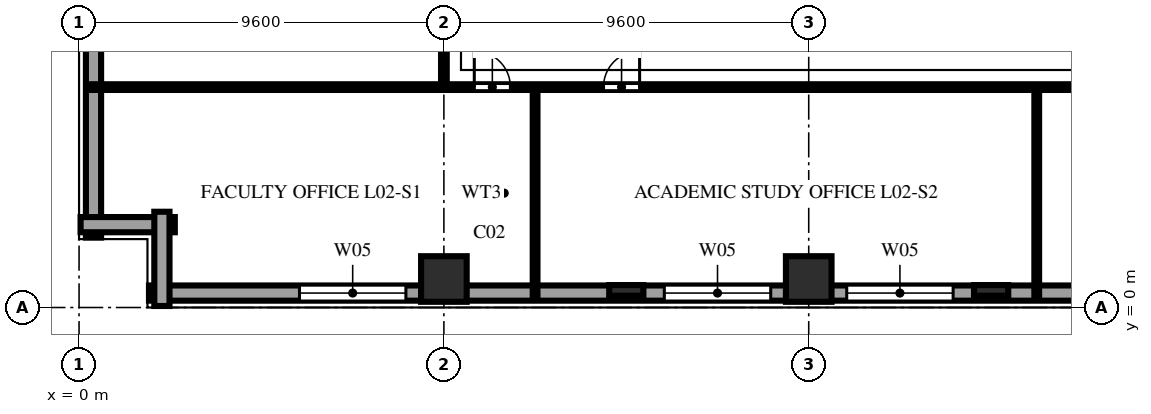
"""IFC4 building model, lengths in metres.
Left out: names, types, materials, properties, quantities, classifications, styles, units other than length and angle.
Written with IfcOpenShell. Run it as: python <this file> out.ifc"""

import sys

from ifc_helpers import new_model, si_unit, direction, frame, frame_2d, origin, origin_2d, place, context, subcontext, project, spatial, rectangle, extrude, element, fill, save


model = new_model("IFC4")
c1 = context("Model", 3, precision=1e-05, world=origin(), true_north=direction((0.0, 1.0)))
c2 = subcontext(c1, "Body", "Model", "MODEL_VIEW")
j1 = project(units=[si_unit("LENGTHUNIT", "METRE"), si_unit("PLANEANGLEUNIT", "RADIAN")], contexts=[c1])
p1 = place(None, origin())
s1 = spatial("IfcSite", under=j1, at=p1, CompositionType="ELEMENT")
p2 = place(p1, origin())
s2 = spatial("IfcBuilding", under=s1, at=p2, CompositionType="ELEMENT")
p3 = place(p2, frame((0.0, 0.0, 10.4)))
s3 = spatial("IfcBuildingStorey", under=s2, at=p3, CompositionType="ELEMENT", Elevation=10.4)
for number, where, z_axis, x_axis in (
    (1, (9.6, 0.75, 0.0), (0.0, 0.0, 1.0), (1.0, 0.0, 0.0)),
    (2, (19.2, 0.75, 0.0), (0.0, 0.0, 1.0), (1.0, 0.0, 0.0)),
):
    element("IfcColumn", number, at=place(p3, frame(where, z_axis=z_axis, x_axis=x_axis)), inside=s3, PredefinedType="COLUMN", context=c2, shape_type="SweptSolid", body=[
        extrude(rectangle(XDim=1.2, YDim=1.2, at=origin_2d()), origin(), (0.0, 0.0, 1.0), 4.6),
    ])
for number, where, z_axis, x_axis in (
    (3, (14.4, 0.45, 0.0), (0.0, 0.0, 1.0), (1.0, 0.0, 0.0)),
    (4, (24.0, 0.45, 0.0), (0.0, 0.0, 1.0), (1.0, 0.0, 0.0)),
):
    element("IfcColumn", number, at=place(p3, frame(where, z_axis=z_axis, x_axis=x_axis)), inside=s3, PredefinedType="PILASTER", context=c2, shape_type="SweptSolid", body=[
        extrude(rectangle(XDim=0.9, YDim=0.28, at=origin_2d()), origin(), (0.0, 0.0, 1.0), 4.6),
    ])
p4 = place(p3, frame((1.84, 0.38, 0.0), z_axis=(0.0, 0.0, 1.0), x_axis=(1.0, 0.0, 0.0)))
e5 = element("IfcWall", 5, at=p4, inside=s3, PredefinedType="SOLIDWALL", context=c2, shape_type="SweptSolid", body=[
    extrude(rectangle(XDim=63.52, YDim=0.4, at=frame_2d((31.76, 0.0))), origin(), (0.0, 0.0, 1.0), 4.26),
])
p5 = place(p4, frame((3.96, 0.0, 0.75)))
e6 = element("IfcOpeningElement", 6, at=p5, cuts=e5, PredefinedType="OPENING", context=c2, shape_type="SweptSolid", body=[
    extrude(rectangle(XDim=2.8, YDim=2.3, at=frame_2d((1.4, 1.15))), frame((0.0, 0.212, 0.0), z_axis=(0.0, -1.0, 0.0), x_axis=(1.0, 0.0, 0.0)), (0.0, 0.0, 1.0), 0.424),
])
p6 = place(p4, frame((13.56, 0.0, 0.75)))
e7 = element("IfcOpeningElement", 7, at=p6, cuts=e5, PredefinedType="OPENING", context=c2, shape_type="SweptSolid", body=[
    extrude(rectangle(XDim=2.8, YDim=2.3, at=frame_2d((1.4, 1.15))), frame((0.0, 0.212, 0.0), z_axis=(0.0, -1.0, 0.0), x_axis=(1.0, 0.0, 0.0)), (0.0, 0.0, 1.0), 0.424),
])
p7 = place(p4, frame((18.36, 0.0, 0.75)))
e8 = element("IfcOpeningElement", 8, at=p7, cuts=e5, PredefinedType="OPENING", context=c2, shape_type="SweptSolid", body=[
    extrude(rectangle(XDim=2.8, YDim=2.3, at=frame_2d((1.4, 1.15))), frame((0.0, 0.212, 0.0), z_axis=(0.0, -1.0, 0.0), x_axis=(1.0, 0.0, 0.0)), (0.0, 0.0, 1.0), 0.424),
])
p8 = place(p4, frame((27.96, 0.0, 0.75)))
e9 = element("IfcOpeningElement", 9, at=p8, cuts=e5, PredefinedType="OPENING", context=c2, shape_type="SweptSolid", body=[
    extrude(rectangle(XDim=2.8, YDim=2.3, at=frame_2d((1.4, 1.15))), frame((0.0, 0.212, 0.0), z_axis=(0.0, -1.0, 0.0), x_axis=(1.0, 0.0, 0.0)), (0.0, 0.0, 1.0), 0.424),
])
p9 = place(p3, frame((0.38, 65.36, 0.0), z_axis=(0.0, 0.0, 1.0), x_axis=(0.0, -1.0, 0.0)))
e10 = element("IfcWall", 10, at=p9, inside=s3, PredefinedType="SOLIDWALL", context=c2, shape_type="SweptSolid", body=[
    extrude(rectangle(XDim=63.52, YDim=0.4, at=frame_2d((31.76, 0.0))), origin(), (0.0, 0.0, 1.0), 4.26),
])
p10 = place(p9, frame((32.76, 0.0, 0.75)))
e11 = element("IfcOpeningElement", 11, at=p10, cuts=e10, PredefinedType="OPENING", context=c2, shape_type="SweptSolid", body=[
    extrude(rectangle(XDim=2.8, YDim=2.3, at=frame_2d((1.4, 1.15))), frame((0.0, 0.212, 0.0), z_axis=(0.0, -1.0, 0.0), x_axis=(1.0, 0.0, 0.0)), (0.0, 0.0, 1.0), 0.424),
])
p11 = place(p9, frame((37.56, 0.0, 0.75)))
e12 = element("IfcOpeningElement", 12, at=p11, cuts=e10, PredefinedType="OPENING", context=c2, shape_type="SweptSolid", body=[
    extrude(rectangle(XDim=2.8, YDim=2.3, at=frame_2d((1.4, 1.15))), frame((0.0, 0.212, 0.0), z_axis=(0.0, -1.0, 0.0), x_axis=(1.0, 0.0, 0.0)), (0.0, 0.0, 1.0), 0.424),
])
p12 = place(p9, frame((42.36, 0.0, 0.75)))
e13 = element("IfcOpeningElement", 13, at=p12, cuts=e10, PredefinedType="OPENING", context=c2, shape_type="SweptSolid", body=[
    extrude(rectangle(XDim=2.8, YDim=2.3, at=frame_2d((1.4, 1.15))), frame((0.0, 0.212, 0.0), z_axis=(0.0, -1.0, 0.0), x_axis=(1.0, 0.0, 0.0)), (0.0, 0.0, 1.0), 0.424),
])
p13 = place(p9, frame((47.16, 0.0, 0.75)))
e14 = element("IfcOpeningElement", 14, at=p13, cuts=e10, PredefinedType="OPENING", context=c2, shape_type="SweptSolid", body=[
    extrude(rectangle(XDim=2.8, YDim=2.3, at=frame_2d((1.4, 1.15))), frame((0.0, 0.212, 0.0), z_axis=(0.0, -1.0, 0.0), x_axis=(1.0, 0.0, 0.0)), (0.0, 0.0, 1.0), 0.424),
])
p14 = place(p9, frame((51.96, 0.0, 0.75)))
e15 = element("IfcOpeningElement", 15, at=p14, cuts=e10, PredefinedType="OPENING", context=c2, shape_type="SweptSolid", body=[
    extrude(rectangle(XDim=2.8, YDim=2.3, at=frame_2d((1.4, 1.15))), frame((0.0, 0.212, 0.0), z_axis=(0.0, -1.0, 0.0), x_axis=(1.0, 0.0, 0.0)), (0.0, 0.0, 1.0), 0.424),
])
for number, where, z_axis, x_axis in (
    (16, (0.04, 2.18, 0.0), (0.0, 0.0, 1.0), (1.0, 0.0, 0.0)),
    (17, (2.18, 2.52, 0.0), (0.0, 0.0, 1.0), (0.0, -1.0, 0.0)),
):
    element("IfcWall", number, at=place(p3, frame(where, z_axis=z_axis, x_axis=x_axis)), inside=s3, PredefinedType="SOLIDWALL", context=c2, shape_type="SweptSolid", body=[
        extrude(rectangle(XDim=2.48, YDim=0.4, at=frame_2d((1.24, 0.0))), origin(), (0.0, 0.0, 1.0), 4.26),
    ])
p15 = place(p3, frame((9.6, 5.8, 0.0), z_axis=(0.0, 0.0, 1.0), x_axis=(0.0, 1.0, 0.0)))
e18 = element("IfcWall", 18, at=p15, inside=s3, PredefinedType="PARTITIONING", context=c2, shape_type="SweptSolid", body=[
    extrude(rectangle(XDim=3.8, YDim=0.15, at=frame_2d((1.9, 0.0))), origin(), (0.0, 0.0, 1.0), 3.644),
])
for number, where, z_axis, x_axis in (
    (19, (12.0, 0.22, 0.0), (0.0, 0.0, 1.0), (0.0, 1.0, 0.0)),
    (20, (25.2, 0.22, 0.0), (0.0, 0.0, 1.0), (0.0, 1.0, 0.0)),
):
    element("IfcWall", number, at=place(p3, frame(where, z_axis=z_axis, x_axis=x_axis)), inside=s3, PredefinedType="PARTITIONING", context=c2, shape_type="SweptSolid", body=[
        extrude(rectangle(XDim=5.58, YDim=0.125, at=frame_2d((2.79, 0.0))), origin(), (0.0, 0.0, 1.0), 4.26),
    ])
p16 = place(p3, frame((0.22, 5.8, 0.0), z_axis=(0.0, 0.0, 1.0), x_axis=(1.0, 0.0, 0.0)))
e21 = element("IfcWall", 21, at=p16, inside=s3, PredefinedType="PARTITIONING", context=c2, shape_type="SweptSolid", body=[
    extrude(rectangle(XDim=52.58, YDim=0.15, at=frame_2d((26.29, 0.0))), origin(), (0.0, 0.0, 1.0), 4.26),
])
p17 = place(p16, frame((10.18, 0.0, 0.0)))
e22 = element("IfcOpeningElement", 22, at=p17, cuts=e21, PredefinedType="OPENING", context=c2, shape_type="SweptSolid", body=[
    extrude(rectangle(XDim=0.95, YDim=2.15, at=frame_2d((0.475, 1.075))), frame((0.0, 0.087, 0.0), z_axis=(0.0, -1.0, 0.0), x_axis=(1.0, 0.0, 0.0)), (0.0, 0.0, 1.0), 0.174),
])
p18 = place(p16, frame((13.58, 0.0, 0.0)))
e23 = element("IfcOpeningElement", 23, at=p18, cuts=e21, PredefinedType="OPENING", context=c2, shape_type="SweptSolid", body=[
    extrude(rectangle(XDim=0.95, YDim=2.15, at=frame_2d((0.475, 1.075))), frame((0.0, 0.087, 0.0), z_axis=(0.0, -1.0, 0.0), x_axis=(1.0, 0.0, 0.0)), (0.0, 0.0, 1.0), 0.174),
])
p19 = place(p16, frame((32.53, 0.0, 0.0)))
e24 = element("IfcOpeningElement", 24, at=p19, cuts=e21, PredefinedType="OPENING", context=c2, shape_type="SweptSolid", body=[
    extrude(rectangle(XDim=0.95, YDim=2.15, at=frame_2d((0.475, 1.075))), frame((0.0, 0.087, 0.0), z_axis=(0.0, -1.0, 0.0), x_axis=(1.0, 0.0, 0.0)), (0.0, 0.0, 1.0), 0.174),
])
p20 = place(p16, frame((41.63, 0.0, 0.0)))
e25 = element("IfcOpeningElement", 25, at=p20, cuts=e21, PredefinedType="OPENING", context=c2, shape_type="SweptSolid", body=[
    extrude(rectangle(XDim=0.95, YDim=2.15, at=frame_2d((0.475, 1.075))), frame((0.0, 0.087, 0.0), z_axis=(0.0, -1.0, 0.0), x_axis=(1.0, 0.0, 0.0)), (0.0, 0.0, 1.0), 0.174),
])
p21 = place(p5, origin())
e26 = element("IfcWindow", 26, at=p21, inside=s3, PartitioningType="TRIPLE_PANEL_VERTICAL", PredefinedType="WINDOW", context=c2, shape_type="SweptSolid", body=[
    extrude(rectangle(XDim=2.8, YDim=2.3, at=frame_2d((1.4, 1.15))), frame((0.0, 0.11, 0.0), z_axis=(0.0, -1.0, 0.0), x_axis=(1.0, 0.0, 0.0)), (0.0, 0.0, 1.0), 0.06),
])
fill(e6, e26)
p22 = place(p6, origin())
e27 = element("IfcWindow", 27, at=p22, inside=s3, PartitioningType="TRIPLE_PANEL_VERTICAL", PredefinedType="WINDOW", context=c2, shape_type="SweptSolid", body=[
    extrude(rectangle(XDim=2.8, YDim=2.3, at=frame_2d((1.4, 1.15))), frame((0.0, 0.11, 0.0), z_axis=(0.0, -1.0, 0.0), x_axis=(1.0, 0.0, 0.0)), (0.0, 0.0, 1.0), 0.06),
])
fill(e7, e27)
p23 = place(p7, origin())
e28 = element("IfcWindow", 28, at=p23, inside=s3, PartitioningType="TRIPLE_PANEL_VERTICAL", PredefinedType="WINDOW", context=c2, shape_type="SweptSolid", body=[
    extrude(rectangle(XDim=2.8, YDim=2.3, at=frame_2d((1.4, 1.15))), frame((0.0, 0.11, 0.0), z_axis=(0.0, -1.0, 0.0), x_axis=(1.0, 0.0, 0.0)), (0.0, 0.0, 1.0), 0.06),
])
fill(e8, e28)
p24 = place(p17, origin())
e29 = element("IfcDoor", 29, at=p24, inside=s3, OperationType="SINGLE_SWING_LEFT", PredefinedType="DOOR", context=c2, shape_type="SweptSolid", body=[
    extrude(rectangle(XDim=0.95, YDim=2.15, at=frame_2d((0.475, 1.075))), frame((0.0, 0.025, 0.0), z_axis=(0.0, -1.0, 0.0), x_axis=(1.0, 0.0, 0.0)), (0.0, 0.0, 1.0), 0.05),
])
fill(e22, e29)
p25 = place(p18, origin())
e30 = element("IfcDoor", 30, at=p25, inside=s3, OperationType="SINGLE_SWING_RIGHT", PredefinedType="DOOR", context=c2, shape_type="SweptSolid", body=[
    extrude(rectangle(XDim=0.95, YDim=2.15, at=frame_2d((0.475, 1.075))), frame((0.0, 0.025, 0.0), z_axis=(0.0, -1.0, 0.0), x_axis=(1.0, 0.0, 0.0)), (0.0, 0.0, 1.0), 0.05),
])
fill(e23, e30)
save(model, sys.argv[1])
